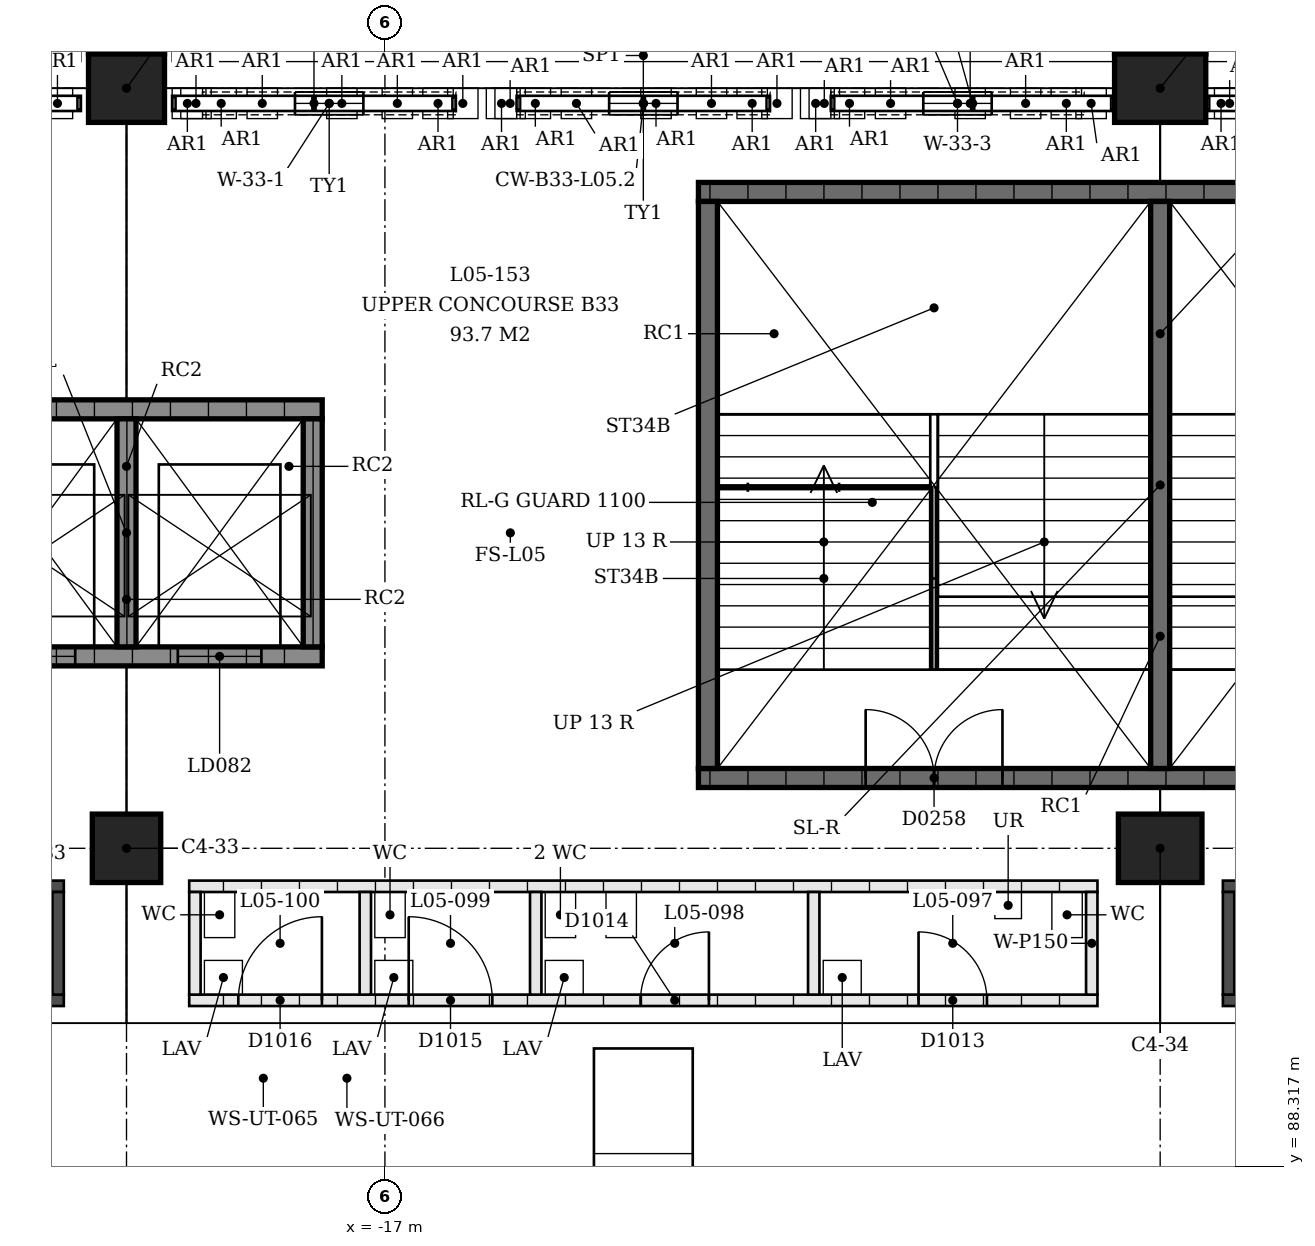
"""IFC4 building model, lengths in metres.
Left out: names, types, materials, properties, quantities, classifications, styles, units other than length and angle.
Written with IfcOpenShell. Run it as: python <this file> out.ifc"""

import sys

from ifc_helpers import new_model, si_unit, direction, frame, frame_2d, origin, origin_2d, place, context, subcontext, project, spatial, polyline, rectangle, outline, extrude, element, fill, save


model = new_model("IFC4")
c1 = context("Model", 3, precision=1e-05, world=origin(), true_north=direction((0.0, 1.0)))
c2 = subcontext(c1, "Body", "Model", "MODEL_VIEW")
j1 = project(units=[si_unit("LENGTHUNIT", "METRE"), si_unit("PLANEANGLEUNIT", "RADIAN")], contexts=[c1])
p1 = place(None, origin())
s1 = spatial("IfcSite", under=j1, at=p1, CompositionType="ELEMENT")
p2 = place(p1, origin())
s2 = spatial("IfcBuilding", under=s1, at=p2, CompositionType="ELEMENT")
p3 = place(p2, frame((0.0, 0.0, 22.5)))
s3 = spatial("IfcBuildingStorey", under=s2, at=p3, CompositionType="ELEMENT", Elevation=22.5)
p4 = place(p3, frame((-20.4, 92.5, 0.0), z_axis=(0.0, 0.0, 1.0), x_axis=(-1.0, 0.0, 0.0)))
e1 = element("IfcColumn", 1, at=p4, inside=s3, PredefinedType="COLUMN", context=c2, shape_type="SweptSolid", body=[
    extrude(rectangle(XDim=0.9, YDim=0.9, at=origin_2d()), origin(), (0.0, 0.0, 1.0), 6.5),
])
p5 = place(p3, frame((-20.4, 102.5, 0.0), z_axis=(0.0, 0.0, 1.0), x_axis=(-1.0, 0.0, 0.0)))
e2 = element("IfcColumn", 2, at=p5, inside=s3, PredefinedType="COLUMN", context=c2, shape_type="SweptSolid", body=[
    extrude(rectangle(XDim=1.0, YDim=0.9, at=origin_2d()), origin(), (0.0, 0.0, 1.0), 6.5),
])
p6 = place(p3, frame((-6.8, 92.5, 0.0), z_axis=(0.0, 0.0, 1.0), x_axis=(-1.0, 0.0, 0.0)))
e3 = element("IfcColumn", 3, at=p6, inside=s3, PredefinedType="COLUMN", context=c2, shape_type="SweptSolid", body=[
    extrude(rectangle(XDim=1.1, YDim=0.9, at=origin_2d()), origin(), (0.0, 0.0, 1.0), 6.5),
])
p7 = place(p3, frame((-6.8, 102.5, 0.0), z_axis=(0.0, 0.0, 1.0), x_axis=(-1.0, 0.0, 0.0)))
e4 = element("IfcColumn", 4, at=p7, inside=s3, PredefinedType="COLUMN", context=c2, shape_type="SweptSolid", body=[
    extrude(rectangle(XDim=1.2, YDim=0.9, at=origin_2d()), origin(), (0.0, 0.0, 1.0), 6.5),
])
p8 = place(p3, frame((-19.4, 102.3, 4.1), z_axis=(0.0, 0.0, 1.0), x_axis=(1.0, 0.0, 0.0)))
e5 = element("IfcWall", 5, at=p8, inside=s3, PredefinedType="SOLIDWALL", context=c2, shape_type="SweptSolid", body=[
    extrude(outline(polyline([(0.0, 0.0), (3.333, 0.0), (3.333, 0.05), (3.225, 1.288), (2.905, 2.541), (2.38, 3.722), (1.667, 4.8), (0.953, 3.722), (0.428, 2.541), (0.108, 1.288), (0.0, 0.05), (0.0, 0.0)])), frame((0.0, 0.15, 0.0), z_axis=(0.0, -1.0, 0.0), x_axis=(1.0, 0.0, 0.0)), (0.0, 0.0, 1.0), 0.3),
])
p9 = place(p8, frame((1.217, 0.0, 0.4)))
e6 = element("IfcOpeningElement", 6, at=p9, cuts=e5, PredefinedType="OPENING", context=c2, shape_type="SweptSolid", body=[
    extrude(rectangle(XDim=0.9, YDim=3.6, at=frame_2d((0.45, 1.8))), frame((0.0, 0.16, 0.0), z_axis=(0.0, -1.0, 0.0), x_axis=(1.0, 0.0, 0.0)), (0.0, 0.0, 1.0), 0.32),
])
p10 = place(p3, frame((-15.267, 102.3, 4.1), z_axis=(0.0, 0.0, 1.0), x_axis=(1.0, 0.0, 0.0)))
e7 = element("IfcWall", 7, at=p10, inside=s3, PredefinedType="SOLIDWALL", context=c2, shape_type="SweptSolid", body=[
    extrude(outline(polyline([(0.0, 0.0), (3.333, 0.0), (3.333, 0.05), (3.225, 1.288), (2.905, 2.541), (2.38, 3.722), (1.667, 4.8), (0.953, 3.722), (0.428, 2.541), (0.108, 1.288), (0.0, 0.05), (0.0, 0.0)])), frame((0.0, 0.15, 0.0), z_axis=(0.0, -1.0, 0.0), x_axis=(1.0, 0.0, 0.0)), (0.0, 0.0, 1.0), 0.3),
])
p11 = place(p10, frame((1.217, 0.0, 0.4)))
e8 = element("IfcOpeningElement", 8, at=p11, cuts=e7, PredefinedType="OPENING", context=c2, shape_type="SweptSolid", body=[
    extrude(rectangle(XDim=0.9, YDim=3.6, at=frame_2d((0.45, 1.8))), frame((0.0, 0.16, 0.0), z_axis=(0.0, -1.0, 0.0), x_axis=(1.0, 0.0, 0.0)), (0.0, 0.0, 1.0), 0.32),
])
p12 = place(p3, frame((-11.133, 102.3, 4.1), z_axis=(0.0, 0.0, 1.0), x_axis=(1.0, 0.0, 0.0)))
e9 = element("IfcWall", 9, at=p12, inside=s3, PredefinedType="SOLIDWALL", context=c2, shape_type="SweptSolid", body=[
    extrude(outline(polyline([(0.0, 0.0), (3.333, 0.0), (3.333, 0.05), (3.225, 1.288), (2.905, 2.541), (2.38, 3.722), (1.667, 4.8), (0.953, 3.722), (0.428, 2.541), (0.108, 1.288), (0.0, 0.05), (0.0, 0.0)])), frame((0.0, 0.15, 0.0), z_axis=(0.0, -1.0, 0.0), x_axis=(1.0, 0.0, 0.0)), (0.0, 0.0, 1.0), 0.3),
])
p13 = place(p12, frame((1.217, 0.0, 0.4)))
e10 = element("IfcOpeningElement", 10, at=p13, cuts=e9, PredefinedType="OPENING", context=c2, shape_type="SweptSolid", body=[
    extrude(rectangle(XDim=0.9, YDim=3.6, at=frame_2d((0.45, 1.8))), frame((0.0, 0.16, 0.0), z_axis=(0.0, -1.0, 0.0), x_axis=(1.0, 0.0, 0.0)), (0.0, 0.0, 1.0), 0.32),
])
p14 = place(p3, frame((-0.725, 93.425, 0.0), z_axis=(0.0, 0.0, 1.0), x_axis=(-1.0, 0.0, 0.0)))
e11 = element("IfcWall", 11, at=p14, inside=s3, PredefinedType="SHEAR", context=c2, shape_type="SweptSolid", body=[
    extrude(rectangle(XDim=12.15, YDim=0.25, at=frame_2d((6.075, 0.0))), origin(), (0.0, 0.0, 1.0), 2.1),
])
p15 = place(p14, frame((2.2, 0.0, 0.0)))
e12 = element("IfcOpeningElement", 12, at=p15, cuts=e11, PredefinedType="OPENING", context=c2, shape_type="SweptSolid", body=[
    extrude(rectangle(XDim=1.8, YDim=2.1, at=frame_2d((0.9, 1.05))), frame((0.0, 0.125, 0.0), z_axis=(0.0, -1.0, 0.0), x_axis=(1.0, 0.0, 0.0)), (0.0, 0.0, 1.0), 0.25),
])
p16 = place(p14, frame((8.15, 0.0, 0.0)))
e13 = element("IfcOpeningElement", 13, at=p16, cuts=e11, PredefinedType="OPENING", context=c2, shape_type="SweptSolid", body=[
    extrude(rectangle(XDim=1.8, YDim=2.1, at=frame_2d((0.9, 1.05))), frame((0.0, 0.125, 0.0), z_axis=(0.0, -1.0, 0.0), x_axis=(1.0, 0.0, 0.0)), (0.0, 0.0, 1.0), 0.25),
])
p17 = place(p3, frame((-0.725, 101.135, 0.0), z_axis=(0.0, 0.0, 1.0), x_axis=(-1.0, 0.0, 0.0)))
e14 = element("IfcWall", 14, at=p17, inside=s3, PredefinedType="SHEAR", context=c2, shape_type="SweptSolid", body=[
    extrude(rectangle(XDim=12.15, YDim=0.25, at=frame_2d((6.075, 0.0))), origin(), (0.0, 0.0, 1.0), 2.1),
])
for number, where, z_axis, x_axis in (
    (15, (-12.75, 93.55, 0.0), (0.0, 0.0, 1.0), (0.0, 1.0, 0.0)),
    (16, (-6.8, 93.55, 0.0), (0.0, 0.0, 1.0), (0.0, 1.0, 0.0)),
):
    element("IfcWall", number, at=place(p3, frame(where, z_axis=z_axis, x_axis=x_axis)), inside=s3, PredefinedType="SHEAR", context=c2, shape_type="SweptSolid", body=[
        extrude(rectangle(XDim=7.46, YDim=0.25, at=frame_2d((3.73, 0.0))), origin(), (0.0, 0.0, 1.0), 2.1),
    ])
p18 = place(p3, frame((-17.825, 95.025, 0.0), z_axis=(0.0, 0.0, 1.0), x_axis=(-1.0, 0.0, 0.0)))
e17 = element("IfcWall", 17, at=p18, inside=s3, PredefinedType="SHEAR", context=c2, shape_type="SweptSolid", body=[
    extrude(rectangle(XDim=5.15, YDim=0.25, at=frame_2d((2.575, 0.0))), origin(), (0.0, 0.0, 1.0), 3.4),
])
p19 = place(p18, frame((0.8, 0.0, 0.0)))
e18 = element("IfcOpeningElement", 18, at=p19, cuts=e17, PredefinedType="OPENING", context=c2, shape_type="SweptSolid", body=[
    extrude(rectangle(XDim=1.1, YDim=2.1, at=frame_2d((0.55, 1.05))), frame((0.0, 0.125, 0.0), z_axis=(0.0, -1.0, 0.0), x_axis=(1.0, 0.0, 0.0)), (0.0, 0.0, 1.0), 0.25),
])
p20 = place(p18, frame((3.25, 0.0, 0.0)))
e19 = element("IfcOpeningElement", 19, at=p20, cuts=e17, PredefinedType="OPENING", context=c2, shape_type="SweptSolid", body=[
    extrude(rectangle(XDim=1.1, YDim=2.1, at=frame_2d((0.55, 1.05))), frame((0.0, 0.125, 0.0), z_axis=(0.0, -1.0, 0.0), x_axis=(1.0, 0.0, 0.0)), (0.0, 0.0, 1.0), 0.25),
])
p21 = place(p3, frame((-17.825, 98.275, 0.0), z_axis=(0.0, 0.0, 1.0), x_axis=(-1.0, 0.0, 0.0)))
e20 = element("IfcWall", 20, at=p21, inside=s3, PredefinedType="SHEAR", context=c2, shape_type="SweptSolid", body=[
    extrude(rectangle(XDim=5.15, YDim=0.25, at=frame_2d((2.575, 0.0))), origin(), (0.0, 0.0, 1.0), 3.4),
])
for number, where, z_axis, x_axis in (
    (21, (-17.95, 95.15, 0.0), (0.0, 0.0, 1.0), (0.0, 1.0, 0.0)),
    (22, (-20.4, 95.15, 0.0), (0.0, 0.0, 1.0), (0.0, 1.0, 0.0)),
):
    element("IfcWall", number, at=place(p3, frame(where, z_axis=z_axis, x_axis=x_axis)), inside=s3, PredefinedType="SHEAR", context=c2, shape_type="SweptSolid", body=[
        extrude(rectangle(XDim=3.0, YDim=0.25, at=frame_2d((1.5, 0.0))), origin(), (0.0, 0.0, 1.0), 3.4),
    ])
p22 = place(p3, frame((-33.175, 90.5, 0.0), z_axis=(0.0, 0.0, 1.0), x_axis=(1.0, 0.0, 0.0)))
e23 = element("IfcWall", 23, at=p22, inside=s3, PredefinedType="SOLIDWALL", context=c2, shape_type="SweptSolid", body=[
    extrude(rectangle(XDim=11.95, YDim=0.15, at=frame_2d((5.975, 0.0))), origin(), (0.0, 0.0, 1.0), 3.0),
])
p23 = place(p22, frame((2.525, 0.0, 0.0)))
e24 = element("IfcOpeningElement", 24, at=p23, cuts=e23, PredefinedType="OPENING", context=c2, shape_type="SweptSolid", body=[
    extrude(rectangle(XDim=1.0, YDim=2.1, at=frame_2d((0.5, 1.05))), frame((0.0, 0.075, 0.0), z_axis=(0.0, -1.0, 0.0), x_axis=(1.0, 0.0, 0.0)), (0.0, 0.0, 1.0), 0.15),
])
p24 = place(p22, frame((8.425, 0.0, 0.0)))
e25 = element("IfcOpeningElement", 25, at=p24, cuts=e23, PredefinedType="OPENING", context=c2, shape_type="SweptSolid", body=[
    extrude(rectangle(XDim=1.0, YDim=2.1, at=frame_2d((0.5, 1.05))), frame((0.0, 0.075, 0.0), z_axis=(0.0, -1.0, 0.0), x_axis=(1.0, 0.0, 0.0)), (0.0, 0.0, 1.0), 0.15),
])
p25 = place(p3, frame((-33.175, 92.0, 0.0), z_axis=(0.0, 0.0, 1.0), x_axis=(1.0, 0.0, 0.0)))
e26 = element("IfcWall", 26, at=p25, inside=s3, PredefinedType="SOLIDWALL", context=c2, shape_type="SweptSolid", body=[
    extrude(rectangle(XDim=11.95, YDim=0.15, at=frame_2d((5.975, 0.0))), origin(), (0.0, 0.0, 1.0), 3.0),
])
p26 = place(p3, frame((-21.3, 90.575, 0.0), z_axis=(0.0, 0.0, 1.0), x_axis=(0.0, 1.0, 0.0)))
e27 = element("IfcWall", 27, at=p26, inside=s3, PredefinedType="SOLIDWALL", context=c2, shape_type="SweptSolid", body=[
    extrude(rectangle(XDim=1.35, YDim=0.15, at=frame_2d((0.675, 0.0))), origin(), (0.0, 0.0, 1.0), 3.0),
])
p27 = place(p3, frame((-7.625, 90.5, 0.0), z_axis=(0.0, 0.0, 1.0), x_axis=(-1.0, 0.0, 0.0)))
e28 = element("IfcWall", 28, at=p27, inside=s3, PredefinedType="PARTITIONING", context=c2, shape_type="SweptSolid", body=[
    extrude(rectangle(XDim=11.95, YDim=0.15, at=frame_2d((5.975, 0.0))), origin(), (0.0, 0.0, 1.0), 3.0),
])
p28 = place(p27, frame((1.454, 0.0, 0.0)))
e29 = element("IfcOpeningElement", 29, at=p28, cuts=e28, PredefinedType="OPENING", context=c2, shape_type="SweptSolid", body=[
    extrude(rectangle(XDim=0.9, YDim=2.1, at=frame_2d((0.45, 1.05))), frame((0.0, 0.075, 0.0), z_axis=(0.0, -1.0, 0.0), x_axis=(1.0, 0.0, 0.0)), (0.0, 0.0, 1.0), 0.15),
])
p29 = place(p27, frame((5.112, 0.0, 0.0)))
e30 = element("IfcOpeningElement", 30, at=p29, cuts=e28, PredefinedType="OPENING", context=c2, shape_type="SweptSolid", body=[
    extrude(rectangle(XDim=0.9, YDim=2.1, at=frame_2d((0.45, 1.05))), frame((0.0, 0.075, 0.0), z_axis=(0.0, -1.0, 0.0), x_axis=(1.0, 0.0, 0.0)), (0.0, 0.0, 1.0), 0.15),
])
p30 = place(p27, frame((7.962, 0.0, 0.0)))
e31 = element("IfcOpeningElement", 31, at=p30, cuts=e28, PredefinedType="OPENING", context=c2, shape_type="SweptSolid", body=[
    extrude(rectangle(XDim=1.1, YDim=2.1, at=frame_2d((0.55, 1.05))), frame((0.0, 0.075, 0.0), z_axis=(0.0, -1.0, 0.0), x_axis=(1.0, 0.0, 0.0)), (0.0, 0.0, 1.0), 0.15),
])
p31 = place(p27, frame((10.204, 0.0, 0.0)))
e32 = element("IfcOpeningElement", 32, at=p31, cuts=e28, PredefinedType="OPENING", context=c2, shape_type="SweptSolid", body=[
    extrude(rectangle(XDim=1.1, YDim=2.1, at=frame_2d((0.55, 1.05))), frame((0.0, 0.075, 0.0), z_axis=(0.0, -1.0, 0.0), x_axis=(1.0, 0.0, 0.0)), (0.0, 0.0, 1.0), 0.15),
])
p32 = place(p3, frame((-7.625, 92.0, 0.0), z_axis=(0.0, 0.0, 1.0), x_axis=(-1.0, 0.0, 0.0)))
e33 = element("IfcWall", 33, at=p32, inside=s3, PredefinedType="PARTITIONING", context=c2, shape_type="SweptSolid", body=[
    extrude(rectangle(XDim=11.95, YDim=0.15, at=frame_2d((5.975, 0.0))), origin(), (0.0, 0.0, 1.0), 3.0),
])
for number, where, z_axis, x_axis in (
    (34, (-7.7, 90.575, 0.0), (0.0, 0.0, 1.0), (0.0, 1.0, 0.0)),
    (35, (-11.358, 90.575, 0.0), (0.0, 0.0, 1.0), (0.0, 1.0, 0.0)),
    (36, (-15.016, 90.575, 0.0), (0.0, 0.0, 1.0), (0.0, 1.0, 0.0)),
    (37, (-17.258, 90.575, 0.0), (0.0, 0.0, 1.0), (0.0, 1.0, 0.0)),
    (38, (-19.5, 90.575, 0.0), (0.0, 0.0, 1.0), (0.0, 1.0, 0.0)),
):
    element("IfcWall", number, at=place(p3, frame(where, z_axis=z_axis, x_axis=x_axis)), inside=s3, PredefinedType="PARTITIONING", context=c2, shape_type="SweptSolid", body=[
        extrude(rectangle(XDim=1.35, YDim=0.15, at=frame_2d((0.675, 0.0))), origin(), (0.0, 0.0, 1.0), 3.0),
    ])
p33 = place(p3, frame((-5.975, 90.5, 0.0), z_axis=(0.0, 0.0, 1.0), x_axis=(1.0, 0.0, 0.0)))
e39 = element("IfcWall", 39, at=p33, inside=s3, PredefinedType="SOLIDWALL", context=c2, shape_type="SweptSolid", body=[
    extrude(rectangle(XDim=11.95, YDim=0.15, at=frame_2d((5.975, 0.0))), origin(), (0.0, 0.0, 1.0), 3.0),
])
p34 = place(p33, frame((2.525, 0.0, 0.0)))
e40 = element("IfcOpeningElement", 40, at=p34, cuts=e39, PredefinedType="OPENING", context=c2, shape_type="SweptSolid", body=[
    extrude(rectangle(XDim=1.0, YDim=2.1, at=frame_2d((0.5, 1.05))), frame((0.0, 0.075, 0.0), z_axis=(0.0, -1.0, 0.0), x_axis=(1.0, 0.0, 0.0)), (0.0, 0.0, 1.0), 0.15),
])
p35 = place(p33, frame((8.425, 0.0, 0.0)))
e41 = element("IfcOpeningElement", 41, at=p35, cuts=e39, PredefinedType="OPENING", context=c2, shape_type="SweptSolid", body=[
    extrude(rectangle(XDim=1.0, YDim=2.1, at=frame_2d((0.5, 1.05))), frame((0.0, 0.075, 0.0), z_axis=(0.0, -1.0, 0.0), x_axis=(1.0, 0.0, 0.0)), (0.0, 0.0, 1.0), 0.15),
])
p36 = place(p3, frame((-5.975, 92.0, 0.0), z_axis=(0.0, 0.0, 1.0), x_axis=(1.0, 0.0, 0.0)))
e42 = element("IfcWall", 42, at=p36, inside=s3, PredefinedType="SOLIDWALL", context=c2, shape_type="SweptSolid", body=[
    extrude(rectangle(XDim=11.95, YDim=0.15, at=frame_2d((5.975, 0.0))), origin(), (0.0, 0.0, 1.0), 3.0),
])
p37 = place(p3, frame((-5.9, 90.575, 0.0), z_axis=(0.0, 0.0, 1.0), x_axis=(0.0, 1.0, 0.0)))
e43 = element("IfcWall", 43, at=p37, inside=s3, PredefinedType="SOLIDWALL", context=c2, shape_type="SweptSolid", body=[
    extrude(rectangle(XDim=1.35, YDim=0.15, at=frame_2d((0.675, 0.0))), origin(), (0.0, 0.0, 1.0), 3.0),
])
p38 = place(p9, origin())
e44 = element("IfcWindow", 44, at=p38, inside=s3, PartitioningType="SINGLE_PANEL", PredefinedType="WINDOW", context=c2, shape_type="SweptSolid", body=[
    extrude(rectangle(XDim=0.9, YDim=3.6, at=frame_2d((0.45, 1.8))), frame((0.0, 0.03, 0.0), z_axis=(0.0, -1.0, 0.0), x_axis=(1.0, 0.0, 0.0)), (0.0, 0.0, 1.0), 0.06),
])
fill(e6, e44)
p39 = place(p11, origin())
e45 = element("IfcWindow", 45, at=p39, inside=s3, PartitioningType="SINGLE_PANEL", PredefinedType="WINDOW", context=c2, shape_type="SweptSolid", body=[
    extrude(rectangle(XDim=0.9, YDim=3.6, at=frame_2d((0.45, 1.8))), frame((0.0, 0.03, 0.0), z_axis=(0.0, -1.0, 0.0), x_axis=(1.0, 0.0, 0.0)), (0.0, 0.0, 1.0), 0.06),
])
fill(e8, e45)
p40 = place(p13, origin())
e46 = element("IfcWindow", 46, at=p40, inside=s3, PartitioningType="SINGLE_PANEL", PredefinedType="WINDOW", context=c2, shape_type="SweptSolid", body=[
    extrude(rectangle(XDim=0.9, YDim=3.6, at=frame_2d((0.45, 1.8))), frame((0.0, 0.03, 0.0), z_axis=(0.0, -1.0, 0.0), x_axis=(1.0, 0.0, 0.0)), (0.0, 0.0, 1.0), 0.06),
])
fill(e10, e46)
p41 = place(p16, origin())
e47 = element("IfcDoor", 47, at=p41, inside=s3, OperationType="DOUBLE_DOOR_SINGLE_SWING", PredefinedType="DOOR", context=c2, shape_type="SweptSolid", body=[
    extrude(rectangle(XDim=1.8, YDim=2.1, at=frame_2d((0.9, 1.05))), frame((0.0, 0.025, 0.0), z_axis=(0.0, -1.0, 0.0), x_axis=(1.0, 0.0, 0.0)), (0.0, 0.0, 1.0), 0.05),
])
fill(e13, e47)
p42 = place(p19, origin())
e48 = element("IfcDoor", 48, at=p42, inside=s3, OperationType="SLIDING_TO_LEFT", PredefinedType="DOOR", context=c2, shape_type="SweptSolid", body=[
    extrude(rectangle(XDim=1.1, YDim=2.1, at=frame_2d((0.55, 1.05))), frame((0.0, 0.025, 0.0), z_axis=(0.0, -1.0, 0.0), x_axis=(1.0, 0.0, 0.0)), (0.0, 0.0, 1.0), 0.05),
])
fill(e18, e48)
p43 = place(p20, origin())
e49 = element("IfcDoor", 49, at=p43, inside=s3, OperationType="SLIDING_TO_LEFT", PredefinedType="DOOR", context=c2, shape_type="SweptSolid", body=[
    extrude(rectangle(XDim=1.1, YDim=2.1, at=frame_2d((0.55, 1.05))), frame((0.0, 0.025, 0.0), z_axis=(0.0, -1.0, 0.0), x_axis=(1.0, 0.0, 0.0)), (0.0, 0.0, 1.0), 0.05),
])
fill(e19, e49)
p44 = place(p28, origin())
e50 = element("IfcDoor", 50, at=p44, inside=s3, OperationType="SINGLE_SWING_RIGHT", PredefinedType="DOOR", context=c2, shape_type="SweptSolid", body=[
    extrude(rectangle(XDim=0.9, YDim=2.1, at=frame_2d((0.45, 1.05))), frame((0.0, 0.025, 0.0), z_axis=(0.0, -1.0, 0.0), x_axis=(1.0, 0.0, 0.0)), (0.0, 0.0, 1.0), 0.05),
])
fill(e29, e50)
p45 = place(p29, origin())
e51 = element("IfcDoor", 51, at=p45, inside=s3, OperationType="SINGLE_SWING_LEFT", PredefinedType="DOOR", context=c2, shape_type="SweptSolid", body=[
    extrude(rectangle(XDim=0.9, YDim=2.1, at=frame_2d((0.45, 1.05))), frame((0.0, 0.025, 0.0), z_axis=(0.0, -1.0, 0.0), x_axis=(1.0, 0.0, 0.0)), (0.0, 0.0, 1.0), 0.05),
])
fill(e30, e51)
p46 = place(p30, origin())
e52 = element("IfcDoor", 52, at=p46, inside=s3, OperationType="SINGLE_SWING_RIGHT", PredefinedType="DOOR", context=c2, shape_type="SweptSolid", body=[
    extrude(rectangle(XDim=1.1, YDim=2.1, at=frame_2d((0.55, 1.05))), frame((0.0, 0.025, 0.0), z_axis=(0.0, -1.0, 0.0), x_axis=(1.0, 0.0, 0.0)), (0.0, 0.0, 1.0), 0.05),
])
fill(e31, e52)
p47 = place(p31, origin())
e53 = element("IfcDoor", 53, at=p47, inside=s3, OperationType="SINGLE_SWING_LEFT", PredefinedType="DOOR", context=c2, shape_type="SweptSolid", body=[
    extrude(rectangle(XDim=1.1, YDim=2.1, at=frame_2d((0.55, 1.05))), frame((0.0, 0.025, 0.0), z_axis=(0.0, -1.0, 0.0), x_axis=(1.0, 0.0, 0.0)), (0.0, 0.0, 1.0), 0.05),
])
fill(e32, e53)
save(model, sys.argv[1])
